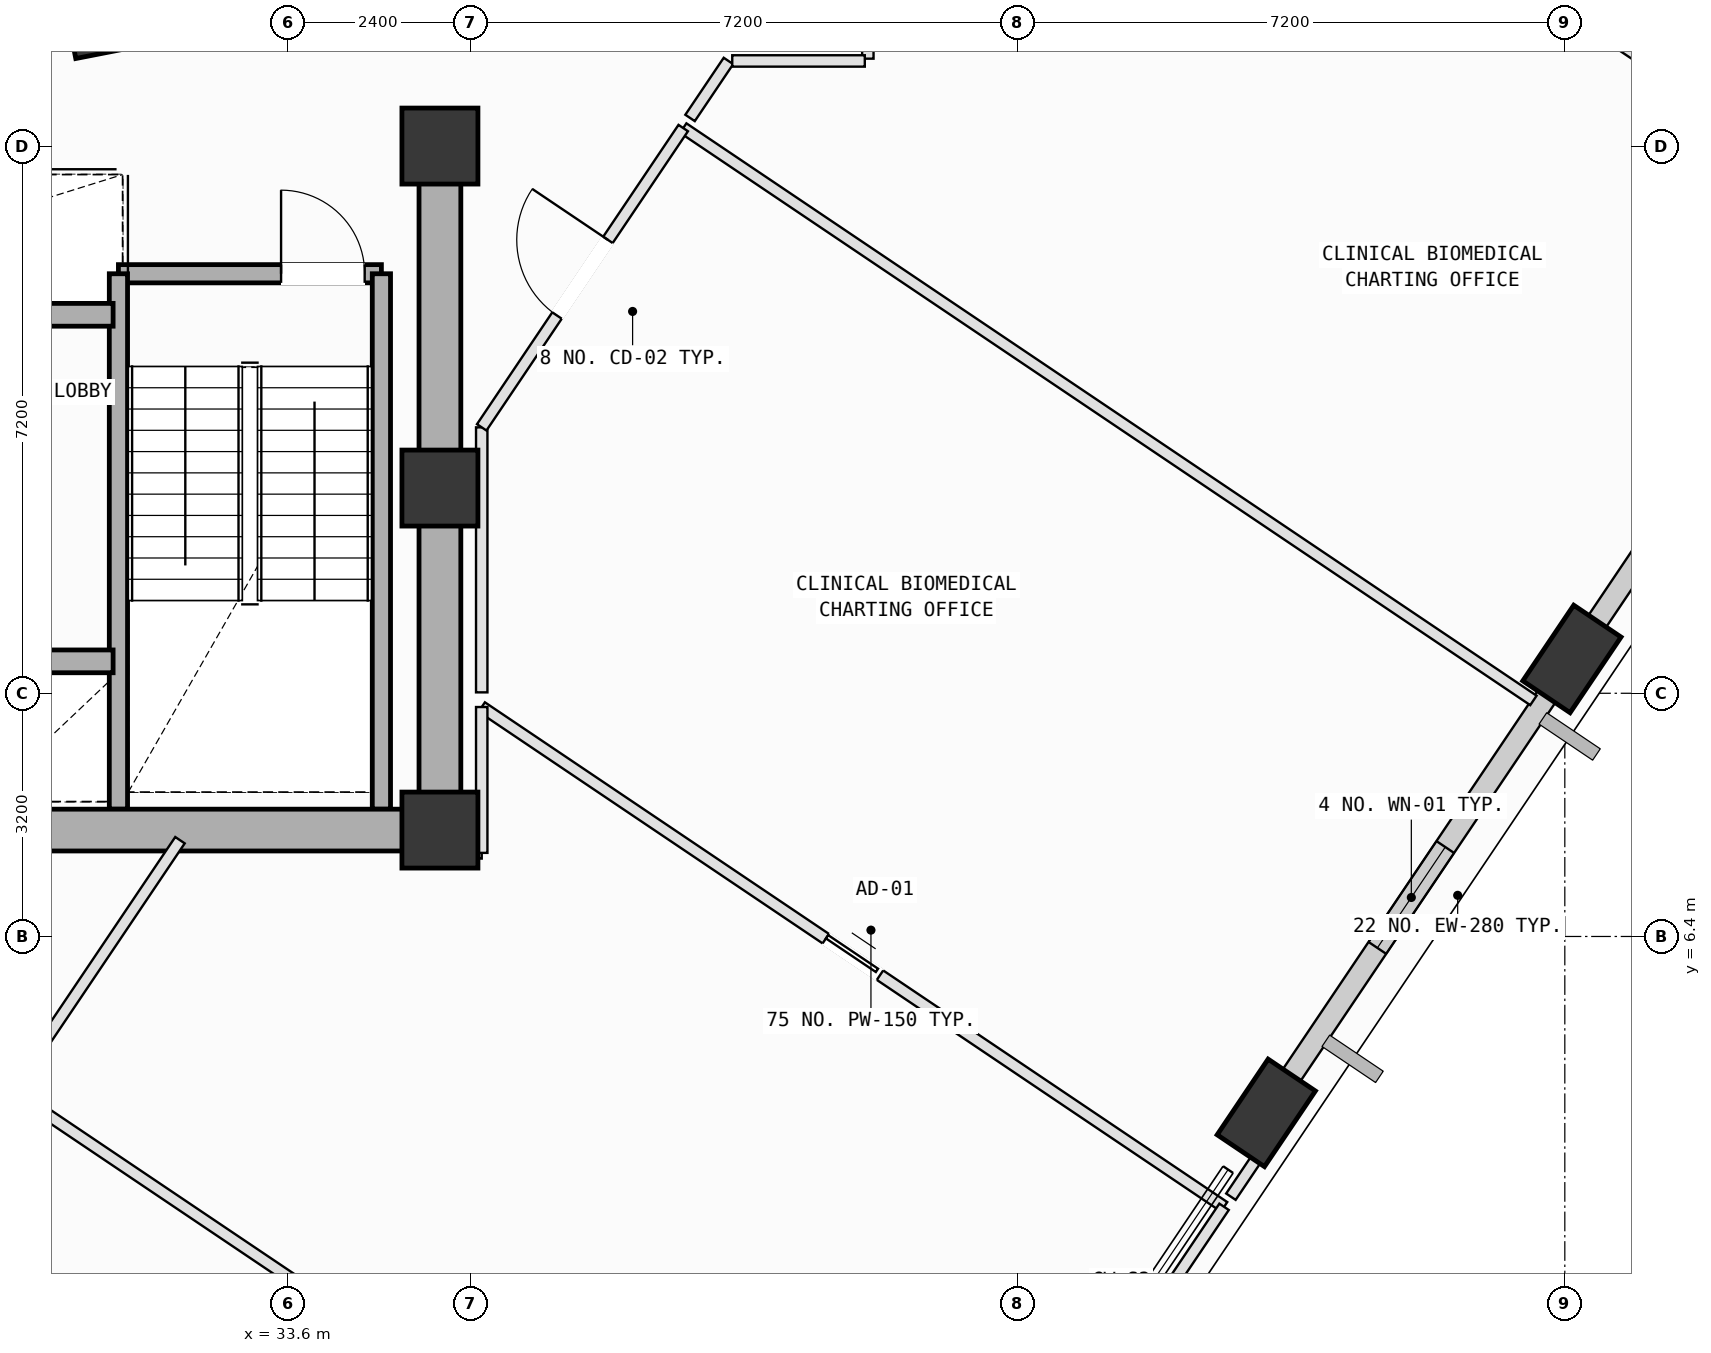
"""IFC4 building model, lengths in metres.
Left out: names, types, materials, properties, quantities, classifications, styles, units other than length and angle.
Written with IfcOpenShell. Run it as: python <this file> out.ifc"""

import sys

from ifc_helpers import new_model, si_unit, direction, frame, frame_2d, origin, origin_2d, place, context, subcontext, project, spatial, rectangle, extrude, element, fill, save


model = new_model("IFC4")
c1 = context("Model", 3, precision=1e-05, world=origin(), true_north=direction((0.0, 1.0)))
c2 = subcontext(c1, "Body", "Model", "MODEL_VIEW")
j1 = project(units=[si_unit("LENGTHUNIT", "METRE"), si_unit("PLANEANGLEUNIT", "RADIAN")], contexts=[c1])
p1 = place(None, origin())
s1 = spatial("IfcSite", under=j1, at=p1, CompositionType="ELEMENT")
p2 = place(p1, origin())
s2 = spatial("IfcBuilding", under=s1, at=p2, CompositionType="ELEMENT")
p3 = place(p2, frame((0.0, 0.0, 263.2)))
s3 = spatial("IfcBuildingStorey", under=s2, at=p3, CompositionType="ELEMENT", Elevation=263.2)
for number, where, z_axis, x_axis in (
    (1, (35.6, 7.8, 0.0), (0.0, 0.0, 1.0), (1.0, 0.0, 0.0)),
    (2, (35.6, 12.3, 0.0), (0.0, 0.0, 1.0), (1.0, 0.0, 0.0)),
    (3, (35.6, 16.8, 0.0), (0.0, 0.0, 1.0), (1.0, 0.0, 0.0)),
):
    element("IfcColumn", number, at=place(p3, frame(where, z_axis=z_axis, x_axis=x_axis)), inside=s3, PredefinedType="COLUMN", context=c2, shape_type="SweptSolid", body=[
        extrude(rectangle(XDim=1.0, YDim=1.0, at=origin_2d()), origin(), (0.0, 0.0, 1.0), 4.0),
    ])
p4 = place(p3, frame((46.472, 4.079, 0.002), z_axis=(0.084979092026, 0.053785018915, 0.994930010432), x_axis=(-0.996046880163, 0.03050995972, 0.083425145348)))
e4 = element("IfcColumn", 4, at=p4, inside=s3, PredefinedType="COLUMN", context=c2, shape_type="SweptSolid", body=[
    extrude(rectangle(XDim=1.2, YDim=0.75, at=origin_2d()), origin(), (0.0, 0.0, 1.0), 3.945),
])
p5 = place(p3, frame((50.493, 10.052, 0.002), z_axis=(0.060244957035, 0.070203312356, 0.995711825824), x_axis=(-0.961707168272, -0.263116868438, 0.076738751868)))
e5 = element("IfcColumn", 5, at=p5, inside=s3, PredefinedType="COLUMN", context=c2, shape_type="SweptSolid", body=[
    extrude(rectangle(XDim=1.2, YDim=0.75, at=origin_2d()), origin(), (0.0, 0.0, 1.0), 3.947),
])
p6 = place(p3, frame((50.375, 9.875, 0.0), z_axis=(0.0, 0.0, 1.0), x_axis=(-0.558480653556, -0.829517546291, 0.0)))
e6 = element("IfcWall", 6, at=p6, inside=s3, PredefinedType="SOLIDWALL", context=c2, shape_type="SweptSolid", body=[
    extrude(rectangle(XDim=6.413, YDim=0.28, at=frame_2d((3.207, 0.0))), origin(), (0.0, 0.0, 1.0), 3.185),
])
p7 = place(p6, frame((2.771, 0.0, 0.75)))
e7 = element("IfcOpeningElement", 7, at=p7, cuts=e6, PredefinedType="OPENING", context=c2, shape_type="SweptSolid", body=[
    extrude(rectangle(XDim=1.6, YDim=1.95, at=frame_2d((0.8, 0.975))), frame((0.0, 0.15, 0.0), z_axis=(0.0, -1.0, 0.0), x_axis=(1.0, 0.0, 0.0)), (0.0, 0.0, 1.0), 0.3),
])
p8 = place(p3, frame((54.396, 15.848, 0.0), z_axis=(0.0, 0.0, 1.0), x_axis=(-0.558449495044, -0.829538523208, 0.0)))
e8 = element("IfcWall", 8, at=p8, inside=s3, PredefinedType="SOLIDWALL", context=c2, shape_type="SweptSolid", body=[
    extrude(rectangle(XDim=6.407, YDim=0.28, at=frame_2d((3.203, 0.0))), origin(), (0.0, 0.0, 1.0), 3.185),
])
p9 = place(p8, frame((2.204, 0.0, 0.75)))
e9 = element("IfcOpeningElement", 9, at=p9, cuts=e8, PredefinedType="OPENING", context=c2, shape_type="SweptSolid", body=[
    extrude(rectangle(XDim=2.0, YDim=1.95, at=frame_2d((1.0, 0.975))), frame((0.0, 0.15, 0.0), z_axis=(0.0, -1.0, 0.0), x_axis=(1.0, 0.0, 0.0)), (0.0, 0.0, 1.0), 0.3),
])
p10 = place(p3, frame((31.37, 15.12, 0.0), z_axis=(0.0, 0.0, 1.0), x_axis=(1.0, 0.0, 0.0)))
e10 = element("IfcWall", 10, at=p10, inside=s3, PredefinedType="SOLIDWALL", context=c2, shape_type="SweptSolid", body=[
    extrude(rectangle(XDim=3.46, YDim=0.24, at=frame_2d((1.73, 0.0))), origin(), (0.0, 0.0, 1.0), 3.7),
])
p11 = place(p10, frame((2.14, 0.0, 0.0)))
e11 = element("IfcOpeningElement", 11, at=p11, cuts=e10, PredefinedType="OPENING", context=c2, shape_type="SweptSolid", body=[
    extrude(rectangle(XDim=1.1, YDim=2.15, at=frame_2d((0.55, 1.075))), frame((0.0, 0.13, 0.0), z_axis=(0.0, -1.0, 0.0), x_axis=(1.0, 0.0, 0.0)), (0.0, 0.0, 1.0), 0.26),
])
for number, where, z_axis, x_axis in (
    (12, (34.83, 15.12, 0.0), (0.0, 0.0, 1.0), (0.0, -1.0, 0.0)),
    (13, (31.37, 8.075, 0.0), (0.0, 0.0, 1.0), (0.0, 1.0, 0.0)),
):
    element("IfcWall", number, at=place(p3, frame(where, z_axis=z_axis, x_axis=x_axis)), inside=s3, PredefinedType="SOLIDWALL", context=c2, shape_type="SweptSolid", body=[
        extrude(rectangle(XDim=7.045, YDim=0.24, at=frame_2d((3.522, 0.0))), origin(), (0.0, 0.0, 1.0), 3.7),
    ])
p12 = place(p3, frame((24.8, 7.8, 0.0), z_axis=(0.0, 0.0, 1.0), x_axis=(1.0, 0.0, 0.0)))
e14 = element("IfcWall", 14, at=p12, inside=s3, PredefinedType="SHEAR", context=c2, shape_type="SweptSolid", body=[
    extrude(rectangle(XDim=10.8, YDim=0.55, at=frame_2d((5.4, 0.0))), origin(), (0.0, 0.0, 1.0), 3.7),
])
p13 = place(p3, frame((35.6, 7.8, 0.0), z_axis=(0.0, 0.0, 1.0), x_axis=(0.0, 1.0, 0.0)))
e15 = element("IfcWall", 15, at=p13, inside=s3, PredefinedType="SHEAR", context=c2, shape_type="SweptSolid", body=[
    extrude(rectangle(XDim=9.0, YDim=0.55, at=frame_2d((4.5, 0.0))), origin(), (0.0, 0.0, 1.0), 3.7),
])
p14 = place(p3, frame((29.6, 10.02, 0.0), z_axis=(0.0, 0.0, 1.0), x_axis=(1.0, 0.0, 0.0)))
e16 = element("IfcWall", 16, at=p14, inside=s3, PredefinedType="SOLIDWALL", context=c2, shape_type="SweptSolid", body=[
    extrude(rectangle(XDim=1.7, YDim=0.3, at=frame_2d((0.85, 0.0))), origin(), (0.0, 0.0, 1.0), 3.7),
])
p15 = place(p3, frame((25.85, 14.58, 0.0), z_axis=(0.0, 0.0, 1.0), x_axis=(1.0, 0.0, 0.0)))
e17 = element("IfcWall", 17, at=p15, inside=s3, PredefinedType="SOLIDWALL", context=c2, shape_type="SweptSolid", body=[
    extrude(rectangle(XDim=5.45, YDim=0.3, at=frame_2d((2.725, 0.0))), origin(), (0.0, 0.0, 1.0), 3.7),
])
p16 = place(p15, frame((0.34, 0.0, 0.0)))
e18 = element("IfcOpeningElement", 18, at=p16, cuts=e17, PredefinedType="OPENING", context=c2, shape_type="SweptSolid", body=[
    extrude(rectangle(XDim=1.12, YDim=2.15, at=frame_2d((0.56, 1.075))), frame((0.0, 0.16, 0.0), z_axis=(0.0, -1.0, 0.0), x_axis=(1.0, 0.0, 0.0)), (0.0, 0.0, 1.0), 0.32),
])
p17 = place(p15, frame((2.24, 0.0, 0.0)))
e19 = element("IfcOpeningElement", 19, at=p17, cuts=e17, PredefinedType="OPENING", context=c2, shape_type="SweptSolid", body=[
    extrude(rectangle(XDim=1.12, YDim=2.15, at=frame_2d((0.56, 1.075))), frame((0.0, 0.16, 0.0), z_axis=(0.0, -1.0, 0.0), x_axis=(1.0, 0.0, 0.0)), (0.0, 0.0, 1.0), 0.32),
])
p18 = place(p3, frame((36.15, 9.419, 0.0), z_axis=(0.0, 0.0, 1.0), x_axis=(0.829512010083, -0.558488876458, 0.0)))
e20 = element("IfcWall", 20, at=p18, inside=s3, PredefinedType="PARTITIONING", context=c2, shape_type="SweptSolid", body=[
    extrude(rectangle(XDim=11.774, YDim=0.15, at=frame_2d((5.887, 0.0))), origin(), (0.0, 0.0, 1.0), 3.085),
])
p19 = place(p18, frame((5.457, 0.0, 0.0)))
e21 = element("IfcOpeningElement", 21, at=p19, cuts=e20, PredefinedType="OPENING", context=c2, shape_type="SweptSolid", body=[
    extrude(rectangle(XDim=0.86, YDim=2.06, at=frame_2d((0.43, 1.03))), frame((0.0, 0.085, 0.0), z_axis=(0.0, -1.0, 0.0), x_axis=(1.0, 0.0, 0.0)), (0.0, 0.0, 1.0), 0.17),
])
p20 = place(p3, frame((45.917, 2.843, 0.0), z_axis=(0.0, 0.0, 1.0), x_axis=(-0.558381708273, -0.829584153577, 0.0)))
e22 = element("IfcWall", 22, at=p20, inside=s3, PredefinedType="PARTITIONING", context=c2, shape_type="SweptSolid", body=[
    extrude(rectangle(XDim=6.051, YDim=0.15, at=frame_2d((3.026, 0.0))), origin(), (0.0, 0.0, 1.0), 3.185),
])
p21 = place(p3, frame((41.365, -3.302, 0.0), z_axis=(0.0, 0.0, 1.0), x_axis=(-0.829542602035, 0.558443436178, 0.0)))
e23 = element("IfcWall", 23, at=p21, inside=s3, PredefinedType="PARTITIONING", context=c2, shape_type="SweptSolid", body=[
    extrude(rectangle(XDim=13.586, YDim=0.15, at=frame_2d((6.793, 0.0))), origin(), (0.0, 0.0, 1.0), 3.7),
])
p22 = place(p3, frame((35.6, 7.5, 0.0), z_axis=(0.0, 0.0, 1.0), x_axis=(1.0, 0.0, 0.0)))
e24 = element("IfcWall", 24, at=p22, inside=s3, PredefinedType="PARTITIONING", context=c2, shape_type="SweptSolid", body=[
    extrude(rectangle(XDim=0.55, YDim=0.15, at=frame_2d((0.275, 0.0))), origin(), (0.0, 0.0, 1.0), 3.085),
])
p23 = place(p3, frame((36.15, 7.5, 0.0), z_axis=(0.0, 0.0, 1.0), x_axis=(0.0, 1.0, 0.0)))
e25 = element("IfcWall", 25, at=p23, inside=s3, PredefinedType="PARTITIONING", context=c2, shape_type="SweptSolid", body=[
    extrude(rectangle(XDim=1.919, YDim=0.15, at=frame_2d((0.959, 0.0))), origin(), (0.0, 0.0, 1.0), 3.085),
])
p24 = place(p3, frame((38.801, 17.037, 0.0), z_axis=(0.0, 0.0, 1.0), x_axis=(0.829520972269, -0.558475564878, 0.0)))
e26 = element("IfcWall", 26, at=p24, inside=s3, PredefinedType="PARTITIONING", context=c2, shape_type="SweptSolid", body=[
    extrude(rectangle(XDim=13.485, YDim=0.15, at=frame_2d((6.742, 0.0))), origin(), (0.0, 0.0, 1.0), 3.7),
])
p25 = place(p3, frame((46.984, 4.427, 0.0), z_axis=(0.0, 0.0, 1.0), x_axis=(-0.558463190608, -0.829529303121, 0.0)))
e27 = element("IfcWall", 27, at=p25, inside=s3, PredefinedType="PARTITIONING", context=c2, shape_type="SweptSolid", body=[
    extrude(rectangle(XDim=1.749, YDim=0.15, at=frame_2d((0.875, 0.0))), origin(), (0.0, 0.0, 1.0), 3.185),
])
p26 = place(p3, frame((36.15, 9.612, 0.0), z_axis=(0.0, 0.0, 1.0), x_axis=(0.0, 1.0, 0.0)))
e28 = element("IfcWall", 28, at=p26, inside=s3, PredefinedType="PARTITIONING", context=c2, shape_type="SweptSolid", body=[
    extrude(rectangle(XDim=3.487, YDim=0.15, at=frame_2d((1.744, 0.0))), origin(), (0.0, 0.0, 1.0), 3.7),
])
p27 = place(p3, frame((36.15, 13.099, 0.0), z_axis=(0.0, 0.0, 1.0), x_axis=(0.558456682141, 0.829533684772, 0.0)))
e29 = element("IfcWall", 29, at=p27, inside=s3, PredefinedType="PARTITIONING", context=c2, shape_type="SweptSolid", body=[
    extrude(rectangle(XDim=4.747, YDim=0.15, at=frame_2d((2.374, 0.0))), origin(), (0.0, 0.0, 1.0), 3.7),
])
p28 = place(p27, frame((1.774, 0.0, 0.0)))
e30 = element("IfcOpeningElement", 30, at=p28, cuts=e29, PredefinedType="OPENING", context=c2, shape_type="SweptSolid", body=[
    extrude(rectangle(XDim=1.2, YDim=2.15, at=frame_2d((0.6, 1.075))), frame((0.0, 0.085, 0.0), z_axis=(0.0, -1.0, 0.0), x_axis=(1.0, 0.0, 0.0)), (0.0, 0.0, 1.0), 0.17),
])
p29 = place(p3, frame((41.23, 17.95, 0.0), z_axis=(0.0, 0.0, 1.0), x_axis=(0.0, 1.0, 0.0)))
e31 = element("IfcWall", 31, at=p29, inside=s3, PredefinedType="PARTITIONING", context=c2, shape_type="SweptSolid", body=[
    extrude(rectangle(XDim=2.694, YDim=0.15, at=frame_2d((1.347, 0.0))), origin(), (0.0, 0.0, 1.0), 3.7),
])
p30 = place(p3, frame((43.198, 23.479, 0.0), z_axis=(0.0, 0.0, 1.0), x_axis=(0.829581933243, -0.558385006994, 0.0)))
e32 = element("IfcWall", 32, at=p30, inside=s3, PredefinedType="PARTITIONING", context=c2, shape_type="SweptSolid", body=[
    extrude(rectangle(XDim=13.466, YDim=0.15, at=frame_2d((6.733, 0.0))), origin(), (0.0, 0.0, 1.0), 3.7),
])
p31 = place(p3, frame((51.009, 10.405, 0.0), z_axis=(0.0, 0.0, 1.0), x_axis=(-0.558600379479, -0.829436927105, 0.0)))
e33 = element("IfcWall", 33, at=p31, inside=s3, PredefinedType="PARTITIONING", context=c2, shape_type="SweptSolid", body=[
    extrude(rectangle(XDim=0.793, YDim=0.15, at=frame_2d((0.396, 0.0))), origin(), (0.0, 0.0, 1.0), 3.185),
])
p32 = place(p3, frame((38.891, 17.17, 0.0), z_axis=(0.0, 0.0, 1.0), x_axis=(0.558433549648, 0.829549257505, 0.0)))
e34 = element("IfcWall", 34, at=p32, inside=s3, PredefinedType="PARTITIONING", context=c2, shape_type="SweptSolid", body=[
    extrude(rectangle(XDim=0.904, YDim=0.15, at=frame_2d((0.452, 0.0))), origin(), (0.0, 0.0, 1.0), 3.7),
])
p33 = place(p3, frame((39.446, 17.92, 0.0), z_axis=(0.0, 0.0, 1.0), x_axis=(1.0, 0.0, 0.0)))
e35 = element("IfcWall", 35, at=p33, inside=s3, PredefinedType="PARTITIONING", context=c2, shape_type="SweptSolid", body=[
    extrude(rectangle(XDim=1.744, YDim=0.15, at=frame_2d((0.872, 0.0))), origin(), (0.0, 0.0, 1.0), 3.7),
])
p34 = place(p3, frame((32.18, 7.667, 0.0), z_axis=(0.0, 0.0, 1.0), x_axis=(-0.558473326286, -0.829522479398, 0.0)))
e36 = element("IfcWall", 36, at=p34, inside=s3, PredefinedType="PARTITIONING", context=c2, shape_type="SweptSolid", body=[
    extrude(rectangle(XDim=12.33, YDim=0.15, at=frame_2d((6.165, 0.0))), origin(), (0.0, 0.0, 1.0), 3.7),
])
p35 = place(p7, origin())
e37 = element("IfcWindow", 37, at=p35, inside=s3, PartitioningType="SINGLE_PANEL", PredefinedType="WINDOW", context=c2, shape_type="SweptSolid", body=[
    extrude(rectangle(XDim=1.6, YDim=1.95, at=frame_2d((0.8, 0.975))), frame((0.0, 0.03, 0.0), z_axis=(0.0, -1.0, 0.0), x_axis=(1.0, 0.0, 0.0)), (0.0, 0.0, 1.0), 0.06),
])
fill(e7, e37)
p36 = place(p11, origin())
e38 = element("IfcDoor", 38, at=p36, inside=s3, OperationType="SINGLE_SWING_LEFT", PredefinedType="DOOR", context=c2, shape_type="SweptSolid", body=[
    extrude(rectangle(XDim=1.1, YDim=2.15, at=frame_2d((0.55, 1.075))), frame((0.0, 0.025, 0.0), z_axis=(0.0, -1.0, 0.0), x_axis=(1.0, 0.0, 0.0)), (0.0, 0.0, 1.0), 0.05),
])
fill(e11, e38)
p37 = place(p28, origin())
e39 = element("IfcDoor", 39, at=p37, inside=s3, OperationType="SINGLE_SWING_RIGHT", PredefinedType="DOOR", context=c2, shape_type="SweptSolid", body=[
    extrude(rectangle(XDim=1.2, YDim=2.15, at=frame_2d((0.6, 1.075))), frame((0.0, 0.025, 0.0), z_axis=(0.0, -1.0, 0.0), x_axis=(1.0, 0.0, 0.0)), (0.0, 0.0, 1.0), 0.05),
])
fill(e30, e39)
p38 = place(p19, origin())
e40 = element("IfcDoor", 40, at=p38, inside=s3, OperationType="SLIDING_TO_LEFT", PredefinedType="DOOR", context=c2, shape_type="SweptSolid", body=[
    extrude(rectangle(XDim=0.86, YDim=2.06, at=frame_2d((0.43, 1.03))), frame((0.0, 0.025, 0.0), z_axis=(0.0, -1.0, 0.0), x_axis=(1.0, 0.0, 0.0)), (0.0, 0.0, 1.0), 0.05),
])
fill(e21, e40)
save(model, sys.argv[1])
